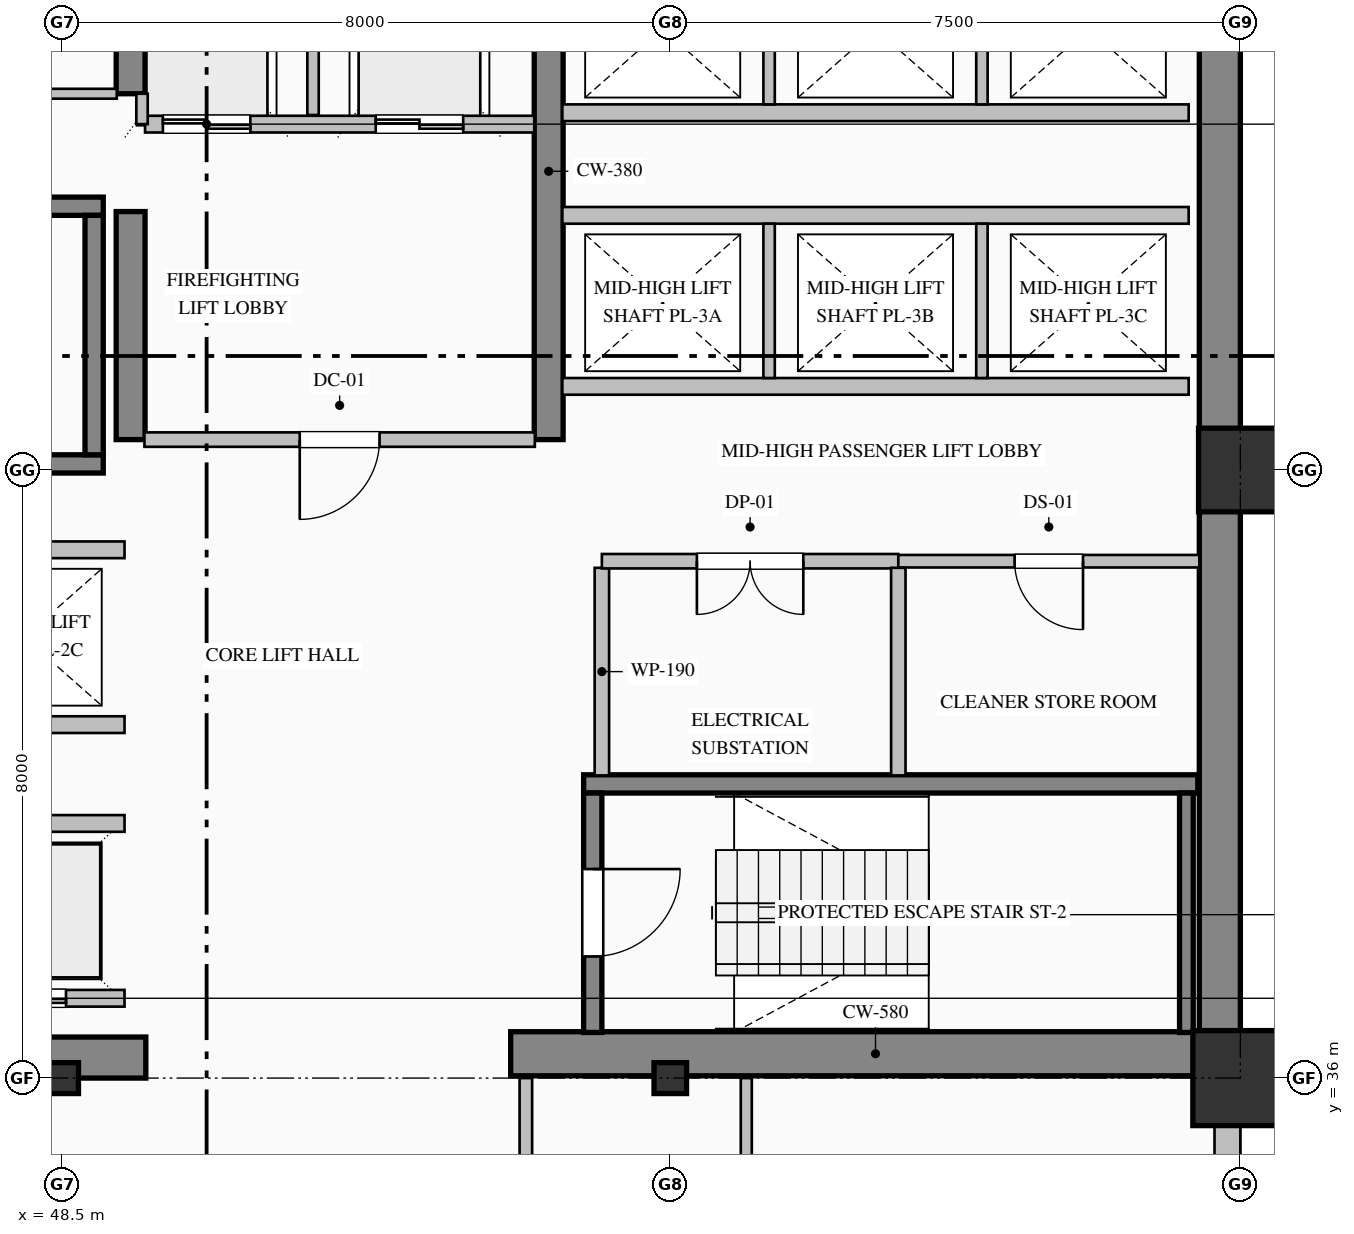
"""IFC4 building model, lengths in metres.
Left out: names, types, materials, properties, quantities, classifications, styles, units other than length and angle.
Written with IfcOpenShell. Run it as: python <this file> out.ifc"""

import sys

from ifc_helpers import new_model, si_unit, direction, frame, frame_2d, origin, origin_2d, place, context, subcontext, project, spatial, rectangle, hollow_rectangle, i_section, extrude, element, fill, save


model = new_model("IFC4")
c1 = context("Model", 3, precision=1e-05, world=origin(), true_north=direction((0.0, 1.0)))
c2 = subcontext(c1, "Body", "Model", "MODEL_VIEW")
j1 = project(units=[si_unit("LENGTHUNIT", "METRE"), si_unit("PLANEANGLEUNIT", "RADIAN")], contexts=[c1])
p1 = place(None, origin())
s1 = spatial("IfcSite", under=j1, at=p1, CompositionType="ELEMENT")
p2 = place(p1, origin())
s2 = spatial("IfcBuilding", under=s1, at=p2, CompositionType="ELEMENT")
p3 = place(p2, frame((0.0, 0.0, 68.2)))
s3 = spatial("IfcBuildingStorey", under=s2, at=p3, CompositionType="ELEMENT", Elevation=68.2)
p4 = place(p3, frame((63.73, 36.32, 0.0), z_axis=(0.0, 0.0, 1.0), x_axis=(0.0, 1.0, 0.0)))
e1 = element("IfcWall", 1, at=p4, inside=s3, PredefinedType="SHEAR", context=c2, shape_type="SweptSolid", body=[
    extrude(rectangle(XDim=15.14, YDim=0.54, at=frame_2d((7.57, 0.0))), origin(), (0.0, 0.0, 1.0), 3.75),
])
p5 = place(p3, frame((48.2, 36.27, 0.0), z_axis=(0.0, 0.0, 1.0), x_axis=(1.0, 0.0, 0.0)))
e2 = element("IfcWall", 2, at=p5, inside=s3, PredefinedType="SHEAR", context=c2, shape_type="SweptSolid", body=[
    extrude(rectangle(XDim=1.4, YDim=0.54, at=frame_2d((0.7, 0.0))), origin(), (0.0, 0.0, 1.0), 3.75),
])
p6 = place(p3, frame((54.4, 36.32, 0.0), z_axis=(0.0, 0.0, 1.0), x_axis=(1.0, 0.0, 0.0)))
e3 = element("IfcWall", 3, at=p6, inside=s3, PredefinedType="SHEAR", context=c2, shape_type="SweptSolid", body=[
    extrude(rectangle(XDim=9.6, YDim=0.58, at=frame_2d((4.8, 0.0))), origin(), (0.0, 0.0, 1.0), 4.0),
])
p7 = place(p3, frame((49.4, 44.4, 0.0), z_axis=(0.0, 0.0, 1.0), x_axis=(0.0, 1.0, 0.0)))
e4 = element("IfcWall", 4, at=p7, inside=s3, PredefinedType="SHEAR", context=c2, shape_type="SweptSolid", body=[
    extrude(rectangle(XDim=3.0, YDim=0.38, at=frame_2d((1.5, 0.0))), origin(), (0.0, 0.0, 1.0), 3.75),
])
p8 = place(p3, frame((49.4, 48.95, 0.0), z_axis=(0.0, 0.0, 1.0), x_axis=(0.0, 1.0, 0.0)))
e5 = element("IfcWall", 5, at=p8, inside=s3, PredefinedType="SHEAR", context=c2, shape_type="SweptSolid", body=[
    extrude(rectangle(XDim=2.51, YDim=0.38, at=frame_2d((1.255, 0.0))), origin(), (0.0, 0.0, 1.0), 3.75),
])
p9 = place(p3, frame((54.9, 44.4, 0.0), z_axis=(0.0, 0.0, 1.0), x_axis=(0.0, 1.0, 0.0)))
e6 = element("IfcWall", 6, at=p9, inside=s3, PredefinedType="SHEAR", context=c2, shape_type="SweptSolid", body=[
    extrude(rectangle(XDim=7.06, YDim=0.38, at=frame_2d((3.53, 0.0))), origin(), (0.0, 0.0, 1.0), 3.75),
])
for number, where, z_axis, x_axis in (
    (7, (48.5, 36.0, 0.0), (0.0, 0.0, 1.0), (1.0, 0.0, 0.0)),
    (8, (56.5, 36.0, 0.0), (0.0, 0.0, 1.0), (1.0, 0.0, 0.0)),
):
    element("IfcColumn", number, at=place(p3, frame(where, z_axis=z_axis, x_axis=x_axis)), inside=s3, PredefinedType="COLUMN", context=c2, shape_type="SweptSolid", body=[
        extrude(i_section(OverallWidth=0.407, OverallDepth=0.428, WebThickness=0.02, FlangeThickness=0.035, FilletRadius=0.022, at=origin_2d()), origin(), (0.0, 0.0, 1.0), 4.0),
    ])
p10 = place(p3, frame((64.0, 36.0, 0.0), z_axis=(0.0, 0.0, 1.0), x_axis=(1.0, 0.0, 0.0)))
e9 = element("IfcColumn", 9, at=p10, inside=s3, PredefinedType="COLUMN", context=c2, shape_type="SweptSolid", body=[
    extrude(hollow_rectangle(XDim=1.25, YDim=1.25, WallThickness=0.045, at=origin_2d()), origin(), (0.0, 0.0, 1.0), 4.0),
])
p11 = place(p3, frame((64.0, 44.0, 0.0), z_axis=(0.0, 0.0, 1.0), x_axis=(1.0, 0.0, 0.0)))
e10 = element("IfcColumn", 10, at=p11, inside=s3, PredefinedType="COLUMN", context=c2, shape_type="SweptSolid", body=[
    extrude(hollow_rectangle(XDim=1.1, YDim=1.1, WallThickness=0.04, at=origin_2d()), origin(), (0.0, 0.0, 1.0), 4.0),
])
p12 = place(p3, frame((63.83, 36.05, 0.0), z_axis=(0.0, 0.0, 1.0), x_axis=(0.0, -1.0, 0.0)))
e11 = element("IfcWall", 11, at=p12, inside=s3, PredefinedType="SOLIDWALL", context=c2, shape_type="SweptSolid", body=[
    extrude(rectangle(XDim=28.05, YDim=0.34, at=frame_2d((14.025, 0.0))), origin(), (0.0, 0.0, 1.0), 3.25),
])
p13 = place(p12, frame((2.55, 0.0, 0.85)))
e12 = element("IfcOpeningElement", 12, at=p13, cuts=e11, PredefinedType="OPENING", context=c2, shape_type="SweptSolid", body=[
    extrude(rectangle(XDim=2.1, YDim=2.05, at=frame_2d((1.05, 1.025))), frame((0.0, 0.18, 0.0), z_axis=(0.0, -1.0, 0.0), x_axis=(1.0, 0.0, 0.0)), (0.0, 0.0, 1.0), 0.36),
])
p14 = place(p12, frame((9.9, 0.0, 0.85)))
e13 = element("IfcOpeningElement", 13, at=p14, cuts=e11, PredefinedType="OPENING", context=c2, shape_type="SweptSolid", body=[
    extrude(rectangle(XDim=1.8, YDim=2.05, at=frame_2d((0.9, 1.025))), frame((0.0, 0.18, 0.0), z_axis=(0.0, -1.0, 0.0), x_axis=(1.0, 0.0, 0.0)), (0.0, 0.0, 1.0), 0.36),
])
p15 = place(p12, frame((13.35, 0.0, 0.85)))
e14 = element("IfcOpeningElement", 14, at=p15, cuts=e11, PredefinedType="OPENING", context=c2, shape_type="SweptSolid", body=[
    extrude(rectangle(XDim=2.1, YDim=2.05, at=frame_2d((1.05, 1.025))), frame((0.0, 0.18, 0.0), z_axis=(0.0, -1.0, 0.0), x_axis=(1.0, 0.0, 0.0)), (0.0, 0.0, 1.0), 0.36),
])
for number, where, z_axis, x_axis in (
    (15, (40.96, 47.47, 0.0), (0.0, 0.0, 1.0), (1.0, 0.0, 0.0)),
    (16, (49.04, 44.08, 0.0), (0.0, 0.0, 1.0), (-1.0, 0.0, 0.0)),
):
    element("IfcWall", number, at=place(p3, frame(where, z_axis=z_axis, x_axis=x_axis)), inside=s3, PredefinedType="SOLIDWALL", context=c2, shape_type="SweptSolid", body=[
        extrude(rectangle(XDim=8.08, YDim=0.24, at=frame_2d((4.04, 0.0))), origin(), (0.0, 0.0, 1.0), 4.0),
    ])
p16 = place(p3, frame((48.92, 44.2, 0.0), z_axis=(0.0, 0.0, 1.0), x_axis=(0.0, 1.0, 0.0)))
e17 = element("IfcWall", 17, at=p16, inside=s3, PredefinedType="SOLIDWALL", context=c2, shape_type="SweptSolid", body=[
    extrude(rectangle(XDim=3.15, YDim=0.24, at=frame_2d((1.575, 0.0))), origin(), (0.0, 0.0, 1.0), 4.0),
])
p17 = place(p3, frame((55.36, 39.87, 0.0), z_axis=(0.0, 0.0, 1.0), x_axis=(1.0, 0.0, 0.0)))
e18 = element("IfcWall", 18, at=p17, inside=s3, PredefinedType="SOLIDWALL", context=c2, shape_type="SweptSolid", body=[
    extrude(rectangle(XDim=8.08, YDim=0.24, at=frame_2d((4.04, 0.0))), origin(), (0.0, 0.0, 1.0), 4.0),
])
p18 = place(p3, frame((55.48, 39.75, 0.0), z_axis=(0.0, 0.0, 1.0), x_axis=(0.0, -1.0, 0.0)))
e19 = element("IfcWall", 19, at=p18, inside=s3, PredefinedType="SOLIDWALL", context=c2, shape_type="SweptSolid", body=[
    extrude(rectangle(XDim=3.15, YDim=0.24, at=frame_2d((1.575, 0.0))), origin(), (0.0, 0.0, 1.0), 4.0),
])
p19 = place(p18, frame((1.0, 0.0, 0.0)))
e20 = element("IfcOpeningElement", 20, at=p19, cuts=e19, PredefinedType="OPENING", context=c2, shape_type="SweptSolid", body=[
    extrude(rectangle(XDim=1.15, YDim=2.2, at=frame_2d((0.575, 1.1))), frame((0.0, 0.13, 0.0), z_axis=(0.0, -1.0, 0.0), x_axis=(1.0, 0.0, 0.0)), (0.0, 0.0, 1.0), 0.26),
])
p20 = place(p3, frame((63.29, 36.6, 0.0), z_axis=(0.0, 0.0, 1.0), x_axis=(0.0, 1.0, 0.0)))
e21 = element("IfcWall", 21, at=p20, inside=s3, PredefinedType="SOLIDWALL", context=c2, shape_type="SweptSolid", body=[
    extrude(rectangle(XDim=3.15, YDim=0.18, at=frame_2d((1.575, 0.0))), origin(), (0.0, 0.0, 1.0), 4.0),
])
p21 = place(p3, frame((54.71, 48.55, 0.0), z_axis=(0.0, 0.0, 1.0), x_axis=(-1.0, 0.0, 0.0)))
e22 = element("IfcWall", 22, at=p21, inside=s3, PredefinedType="PARTITIONING", context=c2, shape_type="SweptSolid", body=[
    extrude(rectangle(XDim=5.12, YDim=0.22, at=frame_2d((2.56, 0.0))), origin(), (0.0, 0.0, 1.0), 3.75),
])
p22 = place(p21, frame((3.735, 0.0, 0.0)))
e23 = element("IfcOpeningElement", 23, at=p22, cuts=e22, PredefinedType="OPENING", context=c2, shape_type="SweptSolid", body=[
    extrude(rectangle(XDim=1.15, YDim=2.2, at=frame_2d((0.575, 1.1))), frame((0.0, 0.12, 0.0), z_axis=(0.0, -1.0, 0.0), x_axis=(1.0, 0.0, 0.0)), (0.0, 0.0, 1.0), 0.24),
])
p23 = place(p21, frame((0.935, 0.0, 0.0)))
e24 = element("IfcOpeningElement", 24, at=p23, cuts=e22, PredefinedType="OPENING", context=c2, shape_type="SweptSolid", body=[
    extrude(rectangle(XDim=1.15, YDim=2.2, at=frame_2d((0.575, 1.1))), frame((0.0, 0.12, 0.0), z_axis=(0.0, -1.0, 0.0), x_axis=(1.0, 0.0, 0.0)), (0.0, 0.0, 1.0), 0.24),
])
p24 = place(p3, frame((51.8, 48.67, 0.0), z_axis=(0.0, 0.0, 1.0), x_axis=(0.0, 1.0, 0.0)))
e25 = element("IfcWall", 25, at=p24, inside=s3, PredefinedType="PARTITIONING", context=c2, shape_type="SweptSolid", body=[
    extrude(rectangle(XDim=2.79, YDim=0.15, at=frame_2d((1.395, 0.0))), origin(), (0.0, 0.0, 1.0), 3.75),
])
p25 = place(p3, frame((49.55, 48.55, 0.0), z_axis=(0.0, 0.0, 1.0), x_axis=(0.0, 1.0, 0.0)))
e26 = element("IfcWall", 26, at=p25, inside=s3, PredefinedType="PARTITIONING", context=c2, shape_type="SweptSolid", body=[
    extrude(rectangle(XDim=0.4, YDim=0.15, at=frame_2d((0.2, 0.0))), origin(), (0.0, 0.0, 1.0), 3.75),
])
p26 = place(p3, frame((49.32, 37.05, 0.0), z_axis=(0.0, 0.0, 1.0), x_axis=(-1.0, 0.0, 0.0)))
e27 = element("IfcWall", 27, at=p26, inside=s3, PredefinedType="PARTITIONING", context=c2, shape_type="SweptSolid", body=[
    extrude(rectangle(XDim=8.24, YDim=0.22, at=frame_2d((4.12, 0.0))), origin(), (0.0, 0.0, 1.0), 3.75),
])
p27 = place(p26, frame((6.37, 0.0, 0.0)))
e28 = element("IfcOpeningElement", 28, at=p27, cuts=e27, PredefinedType="OPENING", context=c2, shape_type="SweptSolid", body=[
    extrude(rectangle(XDim=1.1, YDim=2.2, at=frame_2d((0.55, 1.1))), frame((0.0, 0.12, 0.0), z_axis=(0.0, -1.0, 0.0), x_axis=(1.0, 0.0, 0.0)), (0.0, 0.0, 1.0), 0.24),
])
p28 = place(p26, frame((3.57, 0.0, 0.0)))
e29 = element("IfcOpeningElement", 29, at=p28, cuts=e27, PredefinedType="OPENING", context=c2, shape_type="SweptSolid", body=[
    extrude(rectangle(XDim=1.1, YDim=2.2, at=frame_2d((0.55, 1.1))), frame((0.0, 0.12, 0.0), z_axis=(0.0, -1.0, 0.0), x_axis=(1.0, 0.0, 0.0)), (0.0, 0.0, 1.0), 0.24),
])
p29 = place(p26, frame((0.77, 0.0, 0.0)))
e30 = element("IfcOpeningElement", 30, at=p29, cuts=e27, PredefinedType="OPENING", context=c2, shape_type="SweptSolid", body=[
    extrude(rectangle(XDim=1.1, YDim=2.2, at=frame_2d((0.55, 1.1))), frame((0.0, 0.12, 0.0), z_axis=(0.0, -1.0, 0.0), x_axis=(1.0, 0.0, 0.0)), (0.0, 0.0, 1.0), 0.24),
])
for number, where, z_axis, x_axis in (
    (31, (41.08, 39.35, 0.0), (0.0, 0.0, 1.0), (1.0, 0.0, 0.0)),
    (32, (49.32, 40.65, 0.0), (0.0, 0.0, 1.0), (-1.0, 0.0, 0.0)),
    (33, (41.08, 42.95, 0.0), (0.0, 0.0, 1.0), (1.0, 0.0, 0.0)),
    (34, (63.32, 45.1, 0.0), (0.0, 0.0, 1.0), (-1.0, 0.0, 0.0)),
    (35, (55.08, 47.35, 0.0), (0.0, 0.0, 1.0), (1.0, 0.0, 0.0)),
):
    element("IfcWall", number, at=place(p3, frame(where, z_axis=z_axis, x_axis=x_axis)), inside=s3, PredefinedType="PARTITIONING", context=c2, shape_type="SweptSolid", body=[
        extrude(rectangle(XDim=8.24, YDim=0.22, at=frame_2d((4.12, 0.0))), origin(), (0.0, 0.0, 1.0), 3.75),
    ])
for number, where, z_axis, x_axis in (
    (36, (57.8, 45.21, 0.0), (0.0, 0.0, 1.0), (0.0, 1.0, 0.0)),
    (37, (60.6, 45.21, 0.0), (0.0, 0.0, 1.0), (0.0, 1.0, 0.0)),
):
    element("IfcWall", number, at=place(p3, frame(where, z_axis=z_axis, x_axis=x_axis)), inside=s3, PredefinedType="PARTITIONING", context=c2, shape_type="SweptSolid", body=[
        extrude(rectangle(XDim=2.03, YDim=0.15, at=frame_2d((1.015, 0.0))), origin(), (0.0, 0.0, 1.0), 3.75),
    ])
p30 = place(p3, frame((63.32, 48.7, 0.0), z_axis=(0.0, 0.0, 1.0), x_axis=(-1.0, 0.0, 0.0)))
e38 = element("IfcWall", 38, at=p30, inside=s3, PredefinedType="PARTITIONING", context=c2, shape_type="SweptSolid", body=[
    extrude(rectangle(XDim=8.24, YDim=0.22, at=frame_2d((4.12, 0.0))), origin(), (0.0, 0.0, 1.0), 3.75),
])
for number, where, z_axis, x_axis in (
    (39, (57.8, 48.81, 0.0), (0.0, 0.0, 1.0), (0.0, 1.0, 0.0)),
    (40, (60.6, 48.81, 0.0), (0.0, 0.0, 1.0), (0.0, 1.0, 0.0)),
):
    element("IfcWall", number, at=place(p3, frame(where, z_axis=z_axis, x_axis=x_axis)), inside=s3, PredefinedType="PARTITIONING", context=c2, shape_type="SweptSolid", body=[
        extrude(rectangle(XDim=2.65, YDim=0.15, at=frame_2d((1.325, 0.0))), origin(), (0.0, 0.0, 1.0), 3.75),
    ])
p31 = place(p3, frame((45.2, 48.95, 0.0), z_axis=(0.0, 0.0, 1.0), x_axis=(1.0, 0.0, 0.0)))
e41 = element("IfcWall", 41, at=p31, inside=s3, PredefinedType="PARTITIONING", context=c2, shape_type="SweptSolid", body=[
    extrude(rectangle(XDim=4.018, YDim=0.13, at=frame_2d((2.009, 0.0))), origin(), (0.0, 0.0, 1.0), 3.75),
])
p32 = place(p31, frame((1.549, 0.0, 0.0)))
e42 = element("IfcOpeningElement", 42, at=p32, cuts=e41, PredefinedType="OPENING", context=c2, shape_type="SweptSolid", body=[
    extrude(rectangle(XDim=0.92, YDim=2.15, at=frame_2d((0.46, 1.075))), frame((0.0, 0.075, 0.0), z_axis=(0.0, -1.0, 0.0), x_axis=(1.0, 0.0, 0.0)), (0.0, 0.0, 1.0), 0.15),
])
p33 = place(p3, frame((54.718, 44.4, 0.0), z_axis=(0.0, 0.0, 1.0), x_axis=(-1.0, 0.0, 0.0)))
e43 = element("IfcWall", 43, at=p33, inside=s3, PredefinedType="PARTITIONING", context=c2, shape_type="SweptSolid", body=[
    extrude(rectangle(XDim=5.136, YDim=0.19, at=frame_2d((2.568, 0.0))), origin(), (0.0, 0.0, 1.0), 3.75),
])
p34 = place(p33, frame((2.043, 0.0, 0.0)))
e44 = element("IfcOpeningElement", 44, at=p34, cuts=e43, PredefinedType="OPENING", context=c2, shape_type="SweptSolid", body=[
    extrude(rectangle(XDim=1.05, YDim=2.15, at=frame_2d((0.525, 1.075))), frame((0.0, 0.105, 0.0), z_axis=(0.0, -1.0, 0.0), x_axis=(1.0, 0.0, 0.0)), (0.0, 0.0, 1.0), 0.21),
])
p35 = place(p3, frame((55.6, 42.713, 0.0), z_axis=(0.0, 0.0, 1.0), x_axis=(0.0, -1.0, 0.0)))
e45 = element("IfcWall", 45, at=p35, inside=s3, PredefinedType="PARTITIONING", context=c2, shape_type="SweptSolid", body=[
    extrude(rectangle(XDim=2.731, YDim=0.19, at=frame_2d((1.365, 0.0))), origin(), (0.0, 0.0, 1.0), 3.75),
])
p36 = place(p3, frame((59.5, 42.8, 0.0), z_axis=(0.0, 0.0, 1.0), x_axis=(-1.0, 0.0, 0.0)))
e46 = element("IfcWall", 46, at=p36, inside=s3, PredefinedType="PARTITIONING", context=c2, shape_type="SweptSolid", body=[
    extrude(rectangle(XDim=3.9, YDim=0.19, at=frame_2d((1.95, 0.0))), origin(), (0.0, 0.0, 1.0), 3.75),
])
p37 = place(p36, frame((1.25, 0.0, 0.0)))
e47 = element("IfcOpeningElement", 47, at=p37, cuts=e46, PredefinedType="OPENING", context=c2, shape_type="SweptSolid", body=[
    extrude(rectangle(XDim=1.4, YDim=2.25, at=frame_2d((0.7, 1.125))), frame((0.0, 0.105, 0.0), z_axis=(0.0, -1.0, 0.0), x_axis=(1.0, 0.0, 0.0)), (0.0, 0.0, 1.0), 0.21),
])
p38 = place(p3, frame((63.46, 42.8, 0.0), z_axis=(0.0, 0.0, 1.0), x_axis=(-1.0, 0.0, 0.0)))
e48 = element("IfcWall", 48, at=p38, inside=s3, PredefinedType="PARTITIONING", context=c2, shape_type="SweptSolid", body=[
    extrude(rectangle(XDim=3.96, YDim=0.165, at=frame_2d((1.98, 0.0))), origin(), (0.0, 0.0, 1.0), 3.75),
])
p39 = place(p38, frame((1.53, 0.0, 0.0)))
e49 = element("IfcOpeningElement", 49, at=p39, cuts=e48, PredefinedType="OPENING", context=c2, shape_type="SweptSolid", body=[
    extrude(rectangle(XDim=0.9, YDim=2.15, at=frame_2d((0.45, 1.075))), frame((0.0, 0.093, 0.0), z_axis=(0.0, -1.0, 0.0), x_axis=(1.0, 0.0, 0.0)), (0.0, 0.0, 1.0), 0.185),
])
p40 = place(p3, frame((59.5, 42.713, 0.0), z_axis=(0.0, 0.0, 1.0), x_axis=(0.0, -1.0, 0.0)))
e50 = element("IfcWall", 50, at=p40, inside=s3, PredefinedType="PARTITIONING", context=c2, shape_type="SweptSolid", body=[
    extrude(rectangle(XDim=2.731, YDim=0.19, at=frame_2d((1.365, 0.0))), origin(), (0.0, 0.0, 1.0), 3.75),
])
p41 = place(p3, frame((54.6, 36.0, 0.0), z_axis=(0.0, 0.0, 1.0), x_axis=(0.0, -1.0, 0.0)))
e51 = element("IfcWall", 51, at=p41, inside=s3, PredefinedType="PARTITIONING", context=c2, shape_type="SweptSolid", body=[
    extrude(rectangle(XDim=2.125, YDim=0.165, at=frame_2d((1.063, 0.0))), origin(), (0.0, 0.0, 1.0), 3.75),
])
p42 = place(p3, frame((57.5, 36.0, 0.0), z_axis=(0.0, 0.0, 1.0), x_axis=(0.0, -1.0, 0.0)))
e52 = element("IfcWall", 52, at=p42, inside=s3, PredefinedType="PARTITIONING", context=c2, shape_type="SweptSolid", body=[
    extrude(rectangle(XDim=21.226, YDim=0.145, at=frame_2d((10.613, 0.0))), origin(), (0.0, 0.0, 1.0), 3.75),
])
p43 = place(p19, origin())
e53 = element("IfcDoor", 53, at=p43, inside=s3, OperationType="SINGLE_SWING_LEFT", PredefinedType="DOOR", context=c2, shape_type="SweptSolid", body=[
    extrude(rectangle(XDim=1.15, YDim=2.2, at=frame_2d((0.575, 1.1))), frame((0.0, 0.025, 0.0), z_axis=(0.0, -1.0, 0.0), x_axis=(1.0, 0.0, 0.0)), (0.0, 0.0, 1.0), 0.05),
])
fill(e20, e53)
p44 = place(p22, origin())
e54 = element("IfcDoor", 54, at=p44, inside=s3, OperationType="DOUBLE_DOOR_SLIDING", PredefinedType="DOOR", context=c2, shape_type="SweptSolid", body=[
    extrude(rectangle(XDim=1.15, YDim=2.2, at=frame_2d((0.575, 1.1))), frame((0.0, 0.025, 0.0), z_axis=(0.0, -1.0, 0.0), x_axis=(1.0, 0.0, 0.0)), (0.0, 0.0, 1.0), 0.05),
])
fill(e23, e54)
p45 = place(p23, origin())
e55 = element("IfcDoor", 55, at=p45, inside=s3, OperationType="DOUBLE_DOOR_SLIDING", PredefinedType="DOOR", context=c2, shape_type="SweptSolid", body=[
    extrude(rectangle(XDim=1.15, YDim=2.2, at=frame_2d((0.575, 1.1))), frame((0.0, 0.025, 0.0), z_axis=(0.0, -1.0, 0.0), x_axis=(1.0, 0.0, 0.0)), (0.0, 0.0, 1.0), 0.05),
])
fill(e24, e55)
p46 = place(p29, origin())
e56 = element("IfcDoor", 56, at=p46, inside=s3, OperationType="DOUBLE_DOOR_SLIDING", PredefinedType="DOOR", context=c2, shape_type="SweptSolid", body=[
    extrude(rectangle(XDim=1.1, YDim=2.2, at=frame_2d((0.55, 1.1))), frame((0.0, 0.025, 0.0), z_axis=(0.0, -1.0, 0.0), x_axis=(1.0, 0.0, 0.0)), (0.0, 0.0, 1.0), 0.05),
])
fill(e30, e56)
p47 = place(p34, origin())
e57 = element("IfcDoor", 57, at=p47, inside=s3, OperationType="SINGLE_SWING_RIGHT", PredefinedType="DOOR", context=c2, shape_type="SweptSolid", body=[
    extrude(rectangle(XDim=1.05, YDim=2.15, at=frame_2d((0.525, 1.075))), frame((0.0, 0.025, 0.0), z_axis=(0.0, -1.0, 0.0), x_axis=(1.0, 0.0, 0.0)), (0.0, 0.0, 1.0), 0.05),
])
fill(e44, e57)
p48 = place(p37, origin())
e58 = element("IfcDoor", 58, at=p48, inside=s3, OperationType="DOUBLE_DOOR_SINGLE_SWING", PredefinedType="DOOR", context=c2, shape_type="SweptSolid", body=[
    extrude(rectangle(XDim=1.4, YDim=2.25, at=frame_2d((0.7, 1.125))), frame((0.0, 0.025, 0.0), z_axis=(0.0, -1.0, 0.0), x_axis=(1.0, 0.0, 0.0)), (0.0, 0.0, 1.0), 0.05),
])
fill(e47, e58)
p49 = place(p39, origin())
e59 = element("IfcDoor", 59, at=p49, inside=s3, OperationType="SINGLE_SWING_LEFT", PredefinedType="DOOR", context=c2, shape_type="SweptSolid", body=[
    extrude(rectangle(XDim=0.9, YDim=2.15, at=frame_2d((0.45, 1.075))), frame((0.0, 0.025, 0.0), z_axis=(0.0, -1.0, 0.0), x_axis=(1.0, 0.0, 0.0)), (0.0, 0.0, 1.0), 0.05),
])
fill(e49, e59)
save(model, sys.argv[1])
